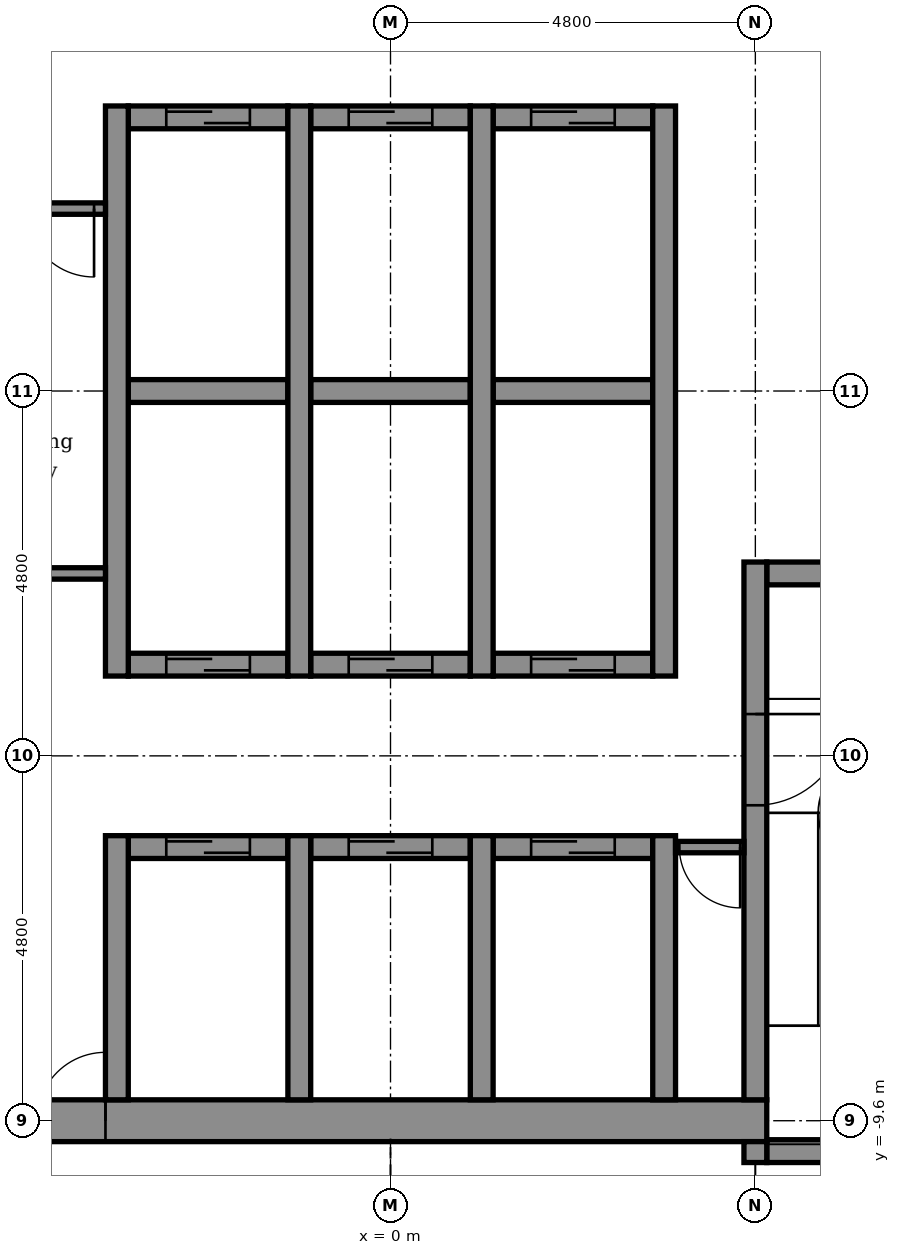
"""IFC4 building model, lengths in metres.
Left out: names, types, materials, properties, quantities, classifications, styles, units other than length and angle.
Written with IfcOpenShell. Run it as: python <this file> out.ifc"""

import sys

from ifc_helpers import new_model, si_unit, direction, frame, frame_2d, origin, place, context, subcontext, project, spatial, rectangle, extrude, element, fill, save


model = new_model("IFC4")
c1 = context("Model", 3, precision=1e-05, world=origin(), true_north=direction((0.0, 1.0)))
c2 = subcontext(c1, "Body", "Model", "MODEL_VIEW")
j1 = project(units=[si_unit("LENGTHUNIT", "METRE"), si_unit("PLANEANGLEUNIT", "RADIAN")], contexts=[c1])
p1 = place(None, origin())
s1 = spatial("IfcSite", under=j1, at=p1, CompositionType="ELEMENT")
p2 = place(p1, origin())
s2 = spatial("IfcBuilding", under=s1, at=p2, CompositionType="ELEMENT")
p3 = place(p2, frame((0.0, 0.0, 269.6)))
s3 = spatial("IfcBuildingStorey", under=s2, at=p3, CompositionType="ELEMENT", Elevation=269.6)
p4 = place(p3, frame((4.95, -10.0, -0.15), z_axis=(0.0, 0.0, 1.0), x_axis=(1.0, 0.0, 0.0)))
e1 = element("IfcWall", 1, at=p4, inside=s3, PredefinedType="STANDARD", context=c2, shape_type="SweptSolid", body=[
    extrude(rectangle(XDim=4.375, YDim=0.3, at=frame_2d((2.188, 0.0))), origin(), (0.0, 0.0, 1.0), 3.9),
])
p5 = place(p3, frame((-5.25, -9.6, -0.15), z_axis=(0.0, 0.0, 1.0), x_axis=(1.0, 0.0, 0.0)))
e2 = element("IfcWall", 2, at=p5, inside=s3, PredefinedType="SHEAR", context=c2, shape_type="SweptSolid", body=[
    extrude(rectangle(XDim=10.2, YDim=0.55, at=frame_2d((5.1, 0.0))), origin(), (0.0, 0.0, 1.0), 3.9),
])
p6 = place(p5, frame((0.6, 0.0, 0.15)))
e3 = element("IfcOpeningElement", 3, at=p6, cuts=e2, PredefinedType="OPENING", context=c2, shape_type="SweptSolid", body=[
    extrude(rectangle(XDim=0.9, YDim=2.1, at=frame_2d((0.45, 1.05))), frame((0.0, 0.285, 0.0), z_axis=(0.0, -1.0, 0.0), x_axis=(1.0, 0.0, 0.0)), (0.0, 0.0, 1.0), 0.57),
])
p7 = place(p3, frame((-3.45, -6.0, -0.15), z_axis=(0.0, 0.0, 1.0), x_axis=(1.0, 0.0, 0.0)))
e4 = element("IfcWall", 4, at=p7, inside=s3, PredefinedType="STANDARD", context=c2, shape_type="SweptSolid", body=[
    extrude(rectangle(XDim=2.1, YDim=0.3, at=frame_2d((1.05, 0.0))), origin(), (0.0, 0.0, 1.0), 3.9),
])
p8 = place(p7, frame((0.5, 0.0, 0.15)))
e5 = element("IfcOpeningElement", 5, at=p8, cuts=e4, PredefinedType="OPENING", context=c2, shape_type="SweptSolid", body=[
    extrude(rectangle(XDim=1.1, YDim=2.1, at=frame_2d((0.55, 1.05))), frame((0.0, 0.16, 0.0), z_axis=(0.0, -1.0, 0.0), x_axis=(1.0, 0.0, 0.0)), (0.0, 0.0, 1.0), 0.32),
])
p9 = place(p3, frame((-1.05, -6.0, -0.15), z_axis=(0.0, 0.0, 1.0), x_axis=(1.0, 0.0, 0.0)))
e6 = element("IfcWall", 6, at=p9, inside=s3, PredefinedType="STANDARD", context=c2, shape_type="SweptSolid", body=[
    extrude(rectangle(XDim=2.1, YDim=0.3, at=frame_2d((1.05, 0.0))), origin(), (0.0, 0.0, 1.0), 3.9),
])
p10 = place(p9, frame((0.5, 0.0, 0.15)))
e7 = element("IfcOpeningElement", 7, at=p10, cuts=e6, PredefinedType="OPENING", context=c2, shape_type="SweptSolid", body=[
    extrude(rectangle(XDim=1.1, YDim=2.1, at=frame_2d((0.55, 1.05))), frame((0.0, 0.16, 0.0), z_axis=(0.0, -1.0, 0.0), x_axis=(1.0, 0.0, 0.0)), (0.0, 0.0, 1.0), 0.32),
])
p11 = place(p3, frame((1.35, -6.0, -0.15), z_axis=(0.0, 0.0, 1.0), x_axis=(1.0, 0.0, 0.0)))
e8 = element("IfcWall", 8, at=p11, inside=s3, PredefinedType="STANDARD", context=c2, shape_type="SweptSolid", body=[
    extrude(rectangle(XDim=2.1, YDim=0.3, at=frame_2d((1.05, 0.0))), origin(), (0.0, 0.0, 1.0), 3.9),
])
p12 = place(p11, frame((0.5, 0.0, 0.15)))
e9 = element("IfcOpeningElement", 9, at=p12, cuts=e8, PredefinedType="OPENING", context=c2, shape_type="SweptSolid", body=[
    extrude(rectangle(XDim=1.1, YDim=2.1, at=frame_2d((0.55, 1.05))), frame((0.0, 0.16, 0.0), z_axis=(0.0, -1.0, 0.0), x_axis=(1.0, 0.0, 0.0)), (0.0, 0.0, 1.0), 0.32),
])
p13 = place(p3, frame((-3.45, -3.6, -0.15), z_axis=(0.0, 0.0, 1.0), x_axis=(1.0, 0.0, 0.0)))
e10 = element("IfcWall", 10, at=p13, inside=s3, PredefinedType="STANDARD", context=c2, shape_type="SweptSolid", body=[
    extrude(rectangle(XDim=2.1, YDim=0.3, at=frame_2d((1.05, 0.0))), origin(), (0.0, 0.0, 1.0), 3.9),
])
p14 = place(p13, frame((0.5, 0.0, 0.15)))
e11 = element("IfcOpeningElement", 11, at=p14, cuts=e10, PredefinedType="OPENING", context=c2, shape_type="SweptSolid", body=[
    extrude(rectangle(XDim=1.1, YDim=2.1, at=frame_2d((0.55, 1.05))), frame((0.0, 0.16, 0.0), z_axis=(0.0, -1.0, 0.0), x_axis=(1.0, 0.0, 0.0)), (0.0, 0.0, 1.0), 0.32),
])
p15 = place(p3, frame((-1.05, -3.6, -0.15), z_axis=(0.0, 0.0, 1.0), x_axis=(1.0, 0.0, 0.0)))
e12 = element("IfcWall", 12, at=p15, inside=s3, PredefinedType="STANDARD", context=c2, shape_type="SweptSolid", body=[
    extrude(rectangle(XDim=2.1, YDim=0.3, at=frame_2d((1.05, 0.0))), origin(), (0.0, 0.0, 1.0), 3.9),
])
p16 = place(p15, frame((0.5, 0.0, 0.15)))
e13 = element("IfcOpeningElement", 13, at=p16, cuts=e12, PredefinedType="OPENING", context=c2, shape_type="SweptSolid", body=[
    extrude(rectangle(XDim=1.1, YDim=2.1, at=frame_2d((0.55, 1.05))), frame((0.0, 0.16, 0.0), z_axis=(0.0, -1.0, 0.0), x_axis=(1.0, 0.0, 0.0)), (0.0, 0.0, 1.0), 0.32),
])
p17 = place(p3, frame((1.35, -3.6, -0.15), z_axis=(0.0, 0.0, 1.0), x_axis=(1.0, 0.0, 0.0)))
e14 = element("IfcWall", 14, at=p17, inside=s3, PredefinedType="STANDARD", context=c2, shape_type="SweptSolid", body=[
    extrude(rectangle(XDim=2.1, YDim=0.3, at=frame_2d((1.05, 0.0))), origin(), (0.0, 0.0, 1.0), 3.9),
])
p18 = place(p17, frame((0.5, 0.0, 0.15)))
e15 = element("IfcOpeningElement", 15, at=p18, cuts=e14, PredefinedType="OPENING", context=c2, shape_type="SweptSolid", body=[
    extrude(rectangle(XDim=1.1, YDim=2.1, at=frame_2d((0.55, 1.05))), frame((0.0, 0.16, 0.0), z_axis=(0.0, -1.0, 0.0), x_axis=(1.0, 0.0, 0.0)), (0.0, 0.0, 1.0), 0.32),
])
p19 = place(p3, frame((4.95, -2.4, -0.15), z_axis=(0.0, 0.0, 1.0), x_axis=(1.0, 0.0, 0.0)))
e16 = element("IfcWall", 16, at=p19, inside=s3, PredefinedType="STANDARD", context=c2, shape_type="SweptSolid", body=[
    extrude(rectangle(XDim=0.9, YDim=0.3, at=frame_2d((0.45, 0.0))), origin(), (0.0, 0.0, 1.0), 3.9),
])
p20 = place(p3, frame((-3.45, 0.0, -0.15), z_axis=(0.0, 0.0, 1.0), x_axis=(1.0, 0.0, 0.0)))
e17 = element("IfcWall", 17, at=p20, inside=s3, PredefinedType="STANDARD", context=c2, shape_type="SweptSolid", body=[
    extrude(rectangle(XDim=2.1, YDim=0.3, at=frame_2d((1.05, 0.0))), origin(), (0.0, 0.0, 1.0), 3.9),
])
p21 = place(p3, frame((-1.05, 0.0, -0.15), z_axis=(0.0, 0.0, 1.0), x_axis=(1.0, 0.0, 0.0)))
e18 = element("IfcWall", 18, at=p21, inside=s3, PredefinedType="STANDARD", context=c2, shape_type="SweptSolid", body=[
    extrude(rectangle(XDim=2.1, YDim=0.3, at=frame_2d((1.05, 0.0))), origin(), (0.0, 0.0, 1.0), 3.9),
])
p22 = place(p3, frame((1.35, 0.0, -0.15), z_axis=(0.0, 0.0, 1.0), x_axis=(1.0, 0.0, 0.0)))
e19 = element("IfcWall", 19, at=p22, inside=s3, PredefinedType="STANDARD", context=c2, shape_type="SweptSolid", body=[
    extrude(rectangle(XDim=2.1, YDim=0.3, at=frame_2d((1.05, 0.0))), origin(), (0.0, 0.0, 1.0), 3.9),
])
p23 = place(p3, frame((-3.45, 3.6, -0.15), z_axis=(0.0, 0.0, 1.0), x_axis=(1.0, 0.0, 0.0)))
e20 = element("IfcWall", 20, at=p23, inside=s3, PredefinedType="STANDARD", context=c2, shape_type="SweptSolid", body=[
    extrude(rectangle(XDim=2.1, YDim=0.3, at=frame_2d((1.05, 0.0))), origin(), (0.0, 0.0, 1.0), 3.9),
])
p24 = place(p23, frame((0.5, 0.0, 0.15)))
e21 = element("IfcOpeningElement", 21, at=p24, cuts=e20, PredefinedType="OPENING", context=c2, shape_type="SweptSolid", body=[
    extrude(rectangle(XDim=1.1, YDim=2.1, at=frame_2d((0.55, 1.05))), frame((0.0, 0.16, 0.0), z_axis=(0.0, -1.0, 0.0), x_axis=(1.0, 0.0, 0.0)), (0.0, 0.0, 1.0), 0.32),
])
p25 = place(p3, frame((-1.05, 3.6, -0.15), z_axis=(0.0, 0.0, 1.0), x_axis=(1.0, 0.0, 0.0)))
e22 = element("IfcWall", 22, at=p25, inside=s3, PredefinedType="STANDARD", context=c2, shape_type="SweptSolid", body=[
    extrude(rectangle(XDim=2.1, YDim=0.3, at=frame_2d((1.05, 0.0))), origin(), (0.0, 0.0, 1.0), 3.9),
])
p26 = place(p25, frame((0.5, 0.0, 0.15)))
e23 = element("IfcOpeningElement", 23, at=p26, cuts=e22, PredefinedType="OPENING", context=c2, shape_type="SweptSolid", body=[
    extrude(rectangle(XDim=1.1, YDim=2.1, at=frame_2d((0.55, 1.05))), frame((0.0, 0.16, 0.0), z_axis=(0.0, -1.0, 0.0), x_axis=(1.0, 0.0, 0.0)), (0.0, 0.0, 1.0), 0.32),
])
p27 = place(p3, frame((1.35, 3.6, -0.15), z_axis=(0.0, 0.0, 1.0), x_axis=(1.0, 0.0, 0.0)))
e24 = element("IfcWall", 24, at=p27, inside=s3, PredefinedType="STANDARD", context=c2, shape_type="SweptSolid", body=[
    extrude(rectangle(XDim=2.1, YDim=0.3, at=frame_2d((1.05, 0.0))), origin(), (0.0, 0.0, 1.0), 3.9),
])
p28 = place(p27, frame((0.5, 0.0, 0.15)))
e25 = element("IfcOpeningElement", 25, at=p28, cuts=e24, PredefinedType="OPENING", context=c2, shape_type="SweptSolid", body=[
    extrude(rectangle(XDim=1.1, YDim=2.1, at=frame_2d((0.55, 1.05))), frame((0.0, 0.16, 0.0), z_axis=(0.0, -1.0, 0.0), x_axis=(1.0, 0.0, 0.0)), (0.0, 0.0, 1.0), 0.32),
])
p29 = place(p3, frame((-3.6, -9.325, -0.15), z_axis=(0.0, 0.0, 1.0), x_axis=(0.0, 1.0, 0.0)))
e26 = element("IfcWall", 26, at=p29, inside=s3, PredefinedType="STANDARD", context=c2, shape_type="SweptSolid", body=[
    extrude(rectangle(XDim=3.475, YDim=0.3, at=frame_2d((1.737, 0.0))), origin(), (0.0, 0.0, 1.0), 3.9),
])
p30 = place(p3, frame((-3.6, -3.75, -0.15), z_axis=(0.0, 0.0, 1.0), x_axis=(0.0, 1.0, 0.0)))
e27 = element("IfcWall", 27, at=p30, inside=s3, PredefinedType="STANDARD", context=c2, shape_type="SweptSolid", body=[
    extrude(rectangle(XDim=7.5, YDim=0.3, at=frame_2d((3.75, 0.0))), origin(), (0.0, 0.0, 1.0), 3.9),
])
p31 = place(p3, frame((-1.2, -9.325, -0.15), z_axis=(0.0, 0.0, 1.0), x_axis=(0.0, 1.0, 0.0)))
e28 = element("IfcWall", 28, at=p31, inside=s3, PredefinedType="STANDARD", context=c2, shape_type="SweptSolid", body=[
    extrude(rectangle(XDim=3.475, YDim=0.3, at=frame_2d((1.737, 0.0))), origin(), (0.0, 0.0, 1.0), 3.9),
])
p32 = place(p3, frame((-1.2, -3.75, -0.15), z_axis=(0.0, 0.0, 1.0), x_axis=(0.0, 1.0, 0.0)))
e29 = element("IfcWall", 29, at=p32, inside=s3, PredefinedType="STANDARD", context=c2, shape_type="SweptSolid", body=[
    extrude(rectangle(XDim=7.5, YDim=0.3, at=frame_2d((3.75, 0.0))), origin(), (0.0, 0.0, 1.0), 3.9),
])
p33 = place(p3, frame((1.2, -9.325, -0.15), z_axis=(0.0, 0.0, 1.0), x_axis=(0.0, 1.0, 0.0)))
e30 = element("IfcWall", 30, at=p33, inside=s3, PredefinedType="STANDARD", context=c2, shape_type="SweptSolid", body=[
    extrude(rectangle(XDim=3.475, YDim=0.3, at=frame_2d((1.737, 0.0))), origin(), (0.0, 0.0, 1.0), 3.9),
])
p34 = place(p3, frame((1.2, -3.75, -0.15), z_axis=(0.0, 0.0, 1.0), x_axis=(0.0, 1.0, 0.0)))
e31 = element("IfcWall", 31, at=p34, inside=s3, PredefinedType="STANDARD", context=c2, shape_type="SweptSolid", body=[
    extrude(rectangle(XDim=7.5, YDim=0.3, at=frame_2d((3.75, 0.0))), origin(), (0.0, 0.0, 1.0), 3.9),
])
p35 = place(p3, frame((3.6, -9.325, -0.15), z_axis=(0.0, 0.0, 1.0), x_axis=(0.0, 1.0, 0.0)))
e32 = element("IfcWall", 32, at=p35, inside=s3, PredefinedType="STANDARD", context=c2, shape_type="SweptSolid", body=[
    extrude(rectangle(XDim=3.475, YDim=0.3, at=frame_2d((1.737, 0.0))), origin(), (0.0, 0.0, 1.0), 3.9),
])
p36 = place(p3, frame((3.6, -3.75, -0.15), z_axis=(0.0, 0.0, 1.0), x_axis=(0.0, 1.0, 0.0)))
e33 = element("IfcWall", 33, at=p36, inside=s3, PredefinedType="STANDARD", context=c2, shape_type="SweptSolid", body=[
    extrude(rectangle(XDim=7.5, YDim=0.3, at=frame_2d((3.75, 0.0))), origin(), (0.0, 0.0, 1.0), 3.9),
])
p37 = place(p3, frame((4.8, -10.15, -0.15), z_axis=(0.0, 0.0, 1.0), x_axis=(0.0, 1.0, 0.0)))
e34 = element("IfcWall", 34, at=p37, inside=s3, PredefinedType="STANDARD", context=c2, shape_type="SweptSolid", body=[
    extrude(rectangle(XDim=0.275, YDim=0.3, at=frame_2d((0.137, 0.0))), origin(), (0.0, 0.0, 1.0), 3.9),
])
p38 = place(p3, frame((4.8, -9.325, -0.15), z_axis=(0.0, 0.0, 1.0), x_axis=(0.0, 1.0, 0.0)))
e35 = element("IfcWall", 35, at=p38, inside=s3, PredefinedType="STANDARD", context=c2, shape_type="SweptSolid", body=[
    extrude(rectangle(XDim=7.075, YDim=0.3, at=frame_2d((3.538, 0.0))), origin(), (0.0, 0.0, 1.0), 3.9),
])
p39 = place(p38, frame((3.875, 0.0, 0.15)))
e36 = element("IfcOpeningElement", 36, at=p39, cuts=e35, PredefinedType="OPENING", context=c2, shape_type="SweptSolid", body=[
    extrude(rectangle(XDim=1.2, YDim=2.1, at=frame_2d((0.6, 1.05))), frame((0.0, 0.16, 0.0), z_axis=(0.0, -1.0, 0.0), x_axis=(1.0, 0.0, 0.0)), (0.0, 0.0, 1.0), 0.32),
])
p40 = place(p3, frame((3.75, -6.0, 0.0), z_axis=(0.0, 0.0, 1.0), x_axis=(1.0, 0.0, 0.0)))
e37 = element("IfcWall", 37, at=p40, inside=s3, PredefinedType="PARTITIONING", context=c2, shape_type="SweptSolid", body=[
    extrude(rectangle(XDim=0.9, YDim=0.15, at=frame_2d((0.45, 0.0))), origin(), (0.0, 0.0, 1.0), 3.75),
])
p41 = place(p40, frame((0.05, 0.0, 0.0)))
e38 = element("IfcOpeningElement", 38, at=p41, cuts=e37, PredefinedType="OPENING", context=c2, shape_type="SweptSolid", body=[
    extrude(rectangle(XDim=0.8, YDim=2.1, at=frame_2d((0.4, 1.05))), frame((0.0, 0.085, 0.0), z_axis=(0.0, -1.0, 0.0), x_axis=(1.0, 0.0, 0.0)), (0.0, 0.0, 1.0), 0.17),
])
p42 = place(p3, frame((-4.95, 2.4, 0.0), z_axis=(0.0, 0.0, 1.0), x_axis=(1.0, 0.0, 0.0)))
e39 = element("IfcWall", 39, at=p42, inside=s3, PredefinedType="PARTITIONING", context=c2, shape_type="SweptSolid", body=[
    extrude(rectangle(XDim=1.2, YDim=0.15, at=frame_2d((0.6, 0.0))), origin(), (0.0, 0.0, 1.0), 3.75),
])
p43 = place(p42, frame((0.15, 0.0, 0.0)))
e40 = element("IfcOpeningElement", 40, at=p43, cuts=e39, PredefinedType="OPENING", context=c2, shape_type="SweptSolid", body=[
    extrude(rectangle(XDim=0.9, YDim=2.1, at=frame_2d((0.45, 1.05))), frame((0.0, 0.085, 0.0), z_axis=(0.0, -1.0, 0.0), x_axis=(1.0, 0.0, 0.0)), (0.0, 0.0, 1.0), 0.17),
])
p44 = place(p3, frame((-4.95, -2.4, 0.0), z_axis=(0.0, 0.0, 1.0), x_axis=(1.0, 0.0, 0.0)))
e41 = element("IfcWall", 41, at=p44, inside=s3, PredefinedType="PARTITIONING", context=c2, shape_type="SweptSolid", body=[
    extrude(rectangle(XDim=1.2, YDim=0.15, at=frame_2d((0.6, 0.0))), origin(), (0.0, 0.0, 1.0), 3.75),
])
p45 = place(p41, frame((0.8, 0.0, 0.0), z_axis=(0.0, 0.0, 1.0), x_axis=(-1.0, 0.0, 0.0)))
e42 = element("IfcDoor", 42, at=p45, inside=s3, OperationType="SINGLE_SWING_RIGHT", PredefinedType="DOOR", context=c2, shape_type="SweptSolid", body=[
    extrude(rectangle(XDim=0.8, YDim=2.1, at=frame_2d((0.4, 1.05))), frame((0.0, 0.025, 0.0), z_axis=(0.0, -1.0, 0.0), x_axis=(1.0, 0.0, 0.0)), (0.0, 0.0, 1.0), 0.05),
])
fill(e38, e42)
p46 = place(p24, origin())
e43 = element("IfcDoor", 43, at=p46, inside=s3, OperationType="DOUBLE_DOOR_SLIDING", PredefinedType="DOOR", context=c2, shape_type="SweptSolid", body=[
    extrude(rectangle(XDim=1.1, YDim=2.1, at=frame_2d((0.55, 1.05))), frame((0.0, 0.025, 0.0), z_axis=(0.0, -1.0, 0.0), x_axis=(1.0, 0.0, 0.0)), (0.0, 0.0, 1.0), 0.05),
])
fill(e21, e43)
p47 = place(p26, origin())
e44 = element("IfcDoor", 44, at=p47, inside=s3, OperationType="DOUBLE_DOOR_SLIDING", PredefinedType="DOOR", context=c2, shape_type="SweptSolid", body=[
    extrude(rectangle(XDim=1.1, YDim=2.1, at=frame_2d((0.55, 1.05))), frame((0.0, 0.025, 0.0), z_axis=(0.0, -1.0, 0.0), x_axis=(1.0, 0.0, 0.0)), (0.0, 0.0, 1.0), 0.05),
])
fill(e23, e44)
p48 = place(p28, origin())
e45 = element("IfcDoor", 45, at=p48, inside=s3, OperationType="DOUBLE_DOOR_SLIDING", PredefinedType="DOOR", context=c2, shape_type="SweptSolid", body=[
    extrude(rectangle(XDim=1.1, YDim=2.1, at=frame_2d((0.55, 1.05))), frame((0.0, 0.025, 0.0), z_axis=(0.0, -1.0, 0.0), x_axis=(1.0, 0.0, 0.0)), (0.0, 0.0, 1.0), 0.05),
])
fill(e25, e45)
p49 = place(p14, origin())
e46 = element("IfcDoor", 46, at=p49, inside=s3, OperationType="DOUBLE_DOOR_SLIDING", PredefinedType="DOOR", context=c2, shape_type="SweptSolid", body=[
    extrude(rectangle(XDim=1.1, YDim=2.1, at=frame_2d((0.55, 1.05))), frame((0.0, 0.025, 0.0), z_axis=(0.0, -1.0, 0.0), x_axis=(1.0, 0.0, 0.0)), (0.0, 0.0, 1.0), 0.05),
])
fill(e11, e46)
p50 = place(p16, origin())
e47 = element("IfcDoor", 47, at=p50, inside=s3, OperationType="DOUBLE_DOOR_SLIDING", PredefinedType="DOOR", context=c2, shape_type="SweptSolid", body=[
    extrude(rectangle(XDim=1.1, YDim=2.1, at=frame_2d((0.55, 1.05))), frame((0.0, 0.025, 0.0), z_axis=(0.0, -1.0, 0.0), x_axis=(1.0, 0.0, 0.0)), (0.0, 0.0, 1.0), 0.05),
])
fill(e13, e47)
p51 = place(p18, origin())
e48 = element("IfcDoor", 48, at=p51, inside=s3, OperationType="DOUBLE_DOOR_SLIDING", PredefinedType="DOOR", context=c2, shape_type="SweptSolid", body=[
    extrude(rectangle(XDim=1.1, YDim=2.1, at=frame_2d((0.55, 1.05))), frame((0.0, 0.025, 0.0), z_axis=(0.0, -1.0, 0.0), x_axis=(1.0, 0.0, 0.0)), (0.0, 0.0, 1.0), 0.05),
])
fill(e15, e48)
p52 = place(p8, origin())
e49 = element("IfcDoor", 49, at=p52, inside=s3, OperationType="DOUBLE_DOOR_SLIDING", PredefinedType="DOOR", context=c2, shape_type="SweptSolid", body=[
    extrude(rectangle(XDim=1.1, YDim=2.1, at=frame_2d((0.55, 1.05))), frame((0.0, 0.025, 0.0), z_axis=(0.0, -1.0, 0.0), x_axis=(1.0, 0.0, 0.0)), (0.0, 0.0, 1.0), 0.05),
])
fill(e5, e49)
p53 = place(p10, origin())
e50 = element("IfcDoor", 50, at=p53, inside=s3, OperationType="DOUBLE_DOOR_SLIDING", PredefinedType="DOOR", context=c2, shape_type="SweptSolid", body=[
    extrude(rectangle(XDim=1.1, YDim=2.1, at=frame_2d((0.55, 1.05))), frame((0.0, 0.025, 0.0), z_axis=(0.0, -1.0, 0.0), x_axis=(1.0, 0.0, 0.0)), (0.0, 0.0, 1.0), 0.05),
])
fill(e7, e50)
p54 = place(p12, origin())
e51 = element("IfcDoor", 51, at=p54, inside=s3, OperationType="DOUBLE_DOOR_SLIDING", PredefinedType="DOOR", context=c2, shape_type="SweptSolid", body=[
    extrude(rectangle(XDim=1.1, YDim=2.1, at=frame_2d((0.55, 1.05))), frame((0.0, 0.025, 0.0), z_axis=(0.0, -1.0, 0.0), x_axis=(1.0, 0.0, 0.0)), (0.0, 0.0, 1.0), 0.05),
])
fill(e9, e51)
p55 = place(p39, frame((1.2, 0.0, 0.0), z_axis=(0.0, 0.0, 1.0), x_axis=(-1.0, 0.0, 0.0)))
e52 = element("IfcDoor", 52, at=p55, inside=s3, OperationType="SINGLE_SWING_RIGHT", PredefinedType="DOOR", context=c2, shape_type="SweptSolid", body=[
    extrude(rectangle(XDim=1.2, YDim=2.1, at=frame_2d((0.6, 1.05))), frame((0.0, 0.025, 0.0), z_axis=(0.0, -1.0, 0.0), x_axis=(1.0, 0.0, 0.0)), (0.0, 0.0, 1.0), 0.05),
])
fill(e36, e52)
p56 = place(p6, origin())
e53 = element("IfcDoor", 53, at=p56, inside=s3, OperationType="SINGLE_SWING_RIGHT", PredefinedType="DOOR", context=c2, shape_type="SweptSolid", body=[
    extrude(rectangle(XDim=0.9, YDim=2.1, at=frame_2d((0.45, 1.05))), frame((0.0, 0.025, 0.0), z_axis=(0.0, -1.0, 0.0), x_axis=(1.0, 0.0, 0.0)), (0.0, 0.0, 1.0), 0.05),
])
fill(e3, e53)
p57 = place(p43, frame((0.9, 0.0, 0.0), z_axis=(0.0, 0.0, 1.0), x_axis=(-1.0, 0.0, 0.0)))
e54 = element("IfcDoor", 54, at=p57, inside=s3, OperationType="SINGLE_SWING_RIGHT", PredefinedType="DOOR", context=c2, shape_type="SweptSolid", body=[
    extrude(rectangle(XDim=0.9, YDim=2.1, at=frame_2d((0.45, 1.05))), frame((0.0, 0.025, 0.0), z_axis=(0.0, -1.0, 0.0), x_axis=(1.0, 0.0, 0.0)), (0.0, 0.0, 1.0), 0.05),
])
fill(e40, e54)
save(model, sys.argv[1])
